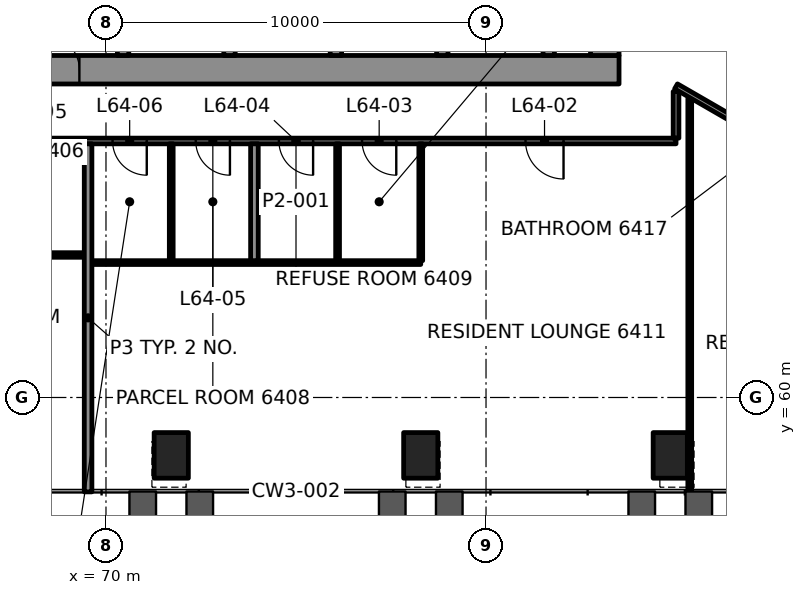
"""IFC4 building model, lengths in metres.
Left out: names, types, materials, properties, quantities, classifications, styles, units other than length and angle.
Written with IfcOpenShell. Run it as: python <this file> out.ifc"""

import sys

from ifc_helpers import new_model, si_unit, direction, frame, frame_2d, origin, origin_2d, place, context, subcontext, project, spatial, rectangle, hollow_rectangle, extrude, element, fill, save


model = new_model("IFC4")
c1 = context("Model", 3, precision=1e-05, world=origin(), true_north=direction((0.0, 1.0)))
c2 = subcontext(c1, "Body", "Model", "MODEL_VIEW")
j1 = project(units=[si_unit("LENGTHUNIT", "METRE"), si_unit("PLANEANGLEUNIT", "RADIAN")], contexts=[c1])
p1 = place(None, origin())
s1 = spatial("IfcSite", under=j1, at=p1, CompositionType="ELEMENT")
p2 = place(p1, origin())
s2 = spatial("IfcBuilding", under=s1, at=p2, CompositionType="ELEMENT")
p3 = place(p2, frame((0.0, 0.0, 270.6)))
s3 = spatial("IfcBuildingStorey", under=s2, at=p3, CompositionType="ELEMENT", Elevation=270.6)
for number, where, z_axis, x_axis in (
    (1, (71.717, 58.476, -0.0), (0.0, 0.0, 1.0), (1.0, 0.0, 0.0)),
    (2, (78.283, 58.476, -0.0), (0.0, 0.0, 1.0), (1.0, 0.0, 0.0)),
    (3, (84.848, 58.476, -0.0), (0.0, 0.0, 1.0), (1.0, 0.0, 0.0)),
):
    element("IfcColumn", number, at=place(p3, frame(where, z_axis=z_axis, x_axis=x_axis)), inside=s3, PredefinedType="COLUMN", context=c2, shape_type="SweptSolid", body=[
        extrude(hollow_rectangle(XDim=0.9, YDim=1.2, WallThickness=0.06, at=origin_2d()), origin(), (0.0, 0.0, 1.0), 3.5),
    ])
p4 = place(p3, frame((66.5, 68.625, 0.0), z_axis=(0.0, 0.0, 1.0), x_axis=(1.0, 0.0, 0.0)))
e4 = element("IfcWall", 4, at=p4, inside=s3, PredefinedType="SHEAR", context=c2, shape_type="SweptSolid", body=[
    extrude(rectangle(XDim=17.0, YDim=0.75, at=frame_2d((8.5, 0.0))), origin(), (0.0, 0.0, 1.0), 3.3),
])
p5 = place(p4, frame((1.9, 0.0, 0.0)))
e5 = element("IfcOpeningElement", 5, at=p5, cuts=e4, PredefinedType="OPENING", context=c2, shape_type="SweptSolid", body=[
    extrude(rectangle(XDim=0.9, YDim=2.1, at=frame_2d((0.45, 1.05))), frame((0.0, 0.385, 0.0), z_axis=(0.0, -1.0, 0.0), x_axis=(1.0, 0.0, 0.0)), (0.0, 0.0, 1.0), 0.77),
])
p6 = place(p3, frame((83.125, 69.0, 0.0), z_axis=(0.0, 0.0, 1.0), x_axis=(0.0, 1.0, 0.0)))
e6 = element("IfcWall", 6, at=p6, inside=s3, PredefinedType="SHEAR", context=c2, shape_type="SweptSolid", body=[
    extrude(rectangle(XDim=12.0, YDim=0.75, at=frame_2d((6.0, 0.0))), origin(), (0.0, 0.0, 1.0), 3.3),
])
p7 = place(p6, frame((3.4, 0.0, 0.0)))
e7 = element("IfcOpeningElement", 7, at=p7, cuts=e6, PredefinedType="OPENING", context=c2, shape_type="SweptSolid", body=[
    extrude(rectangle(XDim=1.8, YDim=2.1, at=frame_2d((0.9, 1.05))), frame((0.0, 0.385, 0.0), z_axis=(0.0, -1.0, 0.0), x_axis=(1.0, 0.0, 0.0)), (0.0, 0.0, 1.0), 0.77),
])
for number, where, z_axis, x_axis in (
    (8, (70.45, 69.0, 0.0), (0.0, 0.0, 1.0), (0.0, 1.0, 0.0)),
    (9, (73.25, 69.0, 0.0), (0.0, 0.0, 1.0), (0.0, 1.0, 0.0)),
    (10, (76.05, 69.0, 0.0), (0.0, 0.0, 1.0), (0.0, 1.0, 0.0)),
    (11, (78.85, 69.0, 0.0), (0.0, 0.0, 1.0), (0.0, 1.0, 0.0)),
    (12, (81.65, 69.0, 0.0), (0.0, 0.0, 1.0), (0.0, 1.0, 0.0)),
):
    element("IfcWall", number, at=place(p3, frame(where, z_axis=z_axis, x_axis=x_axis)), inside=s3, PredefinedType="SHEAR", context=c2, shape_type="SweptSolid", body=[
        extrude(rectangle(XDim=2.6, YDim=0.3, at=frame_2d((1.3, 0.0))), origin(), (0.0, 0.0, 1.0), 3.3),
    ])
p8 = place(p3, frame((69.629, 63.55, 0.0), z_axis=(0.0, 0.0, 1.0), x_axis=(1.0, 0.0, 0.0)))
e13 = element("IfcWall", 13, at=p8, inside=s3, PredefinedType="PARTITIONING", context=c2, shape_type="SweptSolid", body=[
    extrude(rectangle(XDim=8.653, YDim=0.1, at=frame_2d((4.326, 0.0))), origin(), (0.0, 0.0, 1.0), 2.7),
])
p9 = place(p3, frame((63.434, 63.75, 0.0), z_axis=(0.0, 0.0, 1.0), x_axis=(1.0, 0.0, 0.0)))
e14 = element("IfcWall", 14, at=p9, inside=s3, PredefinedType="PARTITIONING", context=c2, shape_type="SweptSolid", body=[
    extrude(rectangle(XDim=5.995, YDim=0.12, at=frame_2d((2.997, 0.0))), origin(), (0.0, 0.0, 1.0), 2.7),
])
p10 = place(p9, frame((3.199, 0.0, 0.0)))
e15 = element("IfcOpeningElement", 15, at=p10, cuts=e14, PredefinedType="OPENING", context=c2, shape_type="SweptSolid", body=[
    extrude(rectangle(XDim=0.9, YDim=2.1, at=frame_2d((0.45, 1.05))), frame((0.0, 0.07, 0.0), z_axis=(0.0, -1.0, 0.0), x_axis=(1.0, 0.0, 0.0)), (0.0, 0.0, 1.0), 0.14),
])
p11 = place(p3, frame((85.0, 66.75, 0.0), z_axis=(0.0, 0.0, 1.0), x_axis=(-1.0, 0.0, 0.0)))
e16 = element("IfcWall", 16, at=p11, inside=s3, PredefinedType="PARTITIONING", context=c2, shape_type="SweptSolid", body=[
    extrude(rectangle(XDim=19.999, YDim=0.15, at=frame_2d((10.0, 0.0))), origin(), (0.0, 0.0, 1.0), 2.7),
])
p12 = place(p11, frame((2.96, 0.0, 0.0)))
e17 = element("IfcOpeningElement", 17, at=p12, cuts=e16, PredefinedType="OPENING", context=c2, shape_type="SweptSolid", body=[
    extrude(rectangle(XDim=1.0, YDim=2.1, at=frame_2d((0.5, 1.05))), frame((0.0, 0.085, 0.0), z_axis=(0.0, -1.0, 0.0), x_axis=(1.0, 0.0, 0.0)), (0.0, 0.0, 1.0), 0.17),
])
p13 = place(p11, frame((7.361, 0.0, 0.0)))
e18 = element("IfcOpeningElement", 18, at=p13, cuts=e16, PredefinedType="OPENING", context=c2, shape_type="SweptSolid", body=[
    extrude(rectangle(XDim=0.9, YDim=2.1, at=frame_2d((0.45, 1.05))), frame((0.0, 0.085, 0.0), z_axis=(0.0, -1.0, 0.0), x_axis=(1.0, 0.0, 0.0)), (0.0, 0.0, 1.0), 0.17),
])
p14 = place(p11, frame((9.55, 0.0, 0.0)))
e19 = element("IfcOpeningElement", 19, at=p14, cuts=e16, PredefinedType="OPENING", context=c2, shape_type="SweptSolid", body=[
    extrude(rectangle(XDim=0.9, YDim=2.1, at=frame_2d((0.45, 1.05))), frame((0.0, 0.085, 0.0), z_axis=(0.0, -1.0, 0.0), x_axis=(1.0, 0.0, 0.0)), (0.0, 0.0, 1.0), 0.17),
])
p15 = place(p11, frame((11.738, 0.0, 0.0)))
e20 = element("IfcOpeningElement", 20, at=p15, cuts=e16, PredefinedType="OPENING", context=c2, shape_type="SweptSolid", body=[
    extrude(rectangle(XDim=0.9, YDim=2.1, at=frame_2d((0.45, 1.05))), frame((0.0, 0.085, 0.0), z_axis=(0.0, -1.0, 0.0), x_axis=(1.0, 0.0, 0.0)), (0.0, 0.0, 1.0), 0.17),
])
p16 = place(p11, frame((13.926, 0.0, 0.0)))
e21 = element("IfcOpeningElement", 21, at=p16, cuts=e16, PredefinedType="OPENING", context=c2, shape_type="SweptSolid", body=[
    extrude(rectangle(XDim=0.9, YDim=2.1, at=frame_2d((0.45, 1.05))), frame((0.0, 0.085, 0.0), z_axis=(0.0, -1.0, 0.0), x_axis=(1.0, 0.0, 0.0)), (0.0, 0.0, 1.0), 0.17),
])
p17 = place(p3, frame((85.361, 57.516, 0.0), z_axis=(0.0, 0.0, 1.0), x_axis=(0.0, 1.0, 0.0)))
e22 = element("IfcWall", 22, at=p17, inside=s3, PredefinedType="PARTITIONING", context=c2, shape_type="SweptSolid", body=[
    extrude(rectangle(XDim=10.346, YDim=0.1, at=frame_2d((5.173, 0.0))), origin(), (0.0, 0.0, 1.0), 2.547),
])
p18 = place(p3, frame((85.0, 66.825, 0.0), z_axis=(0.0, 0.0, 1.0), x_axis=(0.0, 1.0, 0.0)))
e23 = element("IfcWall", 23, at=p18, inside=s3, PredefinedType="PARTITIONING", context=c2, shape_type="SweptSolid", body=[
    extrude(rectangle(XDim=1.225, YDim=0.15, at=frame_2d((0.613, 0.0))), origin(), (0.0, 0.0, 1.0), 2.547),
])
p19 = place(p3, frame((78.283, 63.601, 0.0), z_axis=(0.0, 0.0, 1.0), x_axis=(0.0, 1.0, 0.0)))
e24 = element("IfcWall", 24, at=p19, inside=s3, PredefinedType="PARTITIONING", context=c2, shape_type="SweptSolid", body=[
    extrude(rectangle(XDim=3.074, YDim=0.1, at=frame_2d((1.537, 0.0))), origin(), (0.0, 0.0, 1.0), 2.7),
])
p20 = place(p3, frame((76.094, 63.6, 0.0), z_axis=(0.0, 0.0, 1.0), x_axis=(0.0, 1.0, 0.0)))
e25 = element("IfcWall", 25, at=p20, inside=s3, PredefinedType="PARTITIONING", context=c2, shape_type="SweptSolid", body=[
    extrude(rectangle(XDim=3.075, YDim=0.1, at=frame_2d((1.538, 0.0))), origin(), (0.0, 0.0, 1.0), 2.7),
])
p21 = place(p3, frame((73.906, 63.6, 0.0), z_axis=(0.0, 0.0, 1.0), x_axis=(0.0, 1.0, 0.0)))
e26 = element("IfcWall", 26, at=p21, inside=s3, PredefinedType="PARTITIONING", context=c2, shape_type="SweptSolid", body=[
    extrude(rectangle(XDim=3.075, YDim=0.2, at=frame_2d((1.538, 0.0))), origin(), (0.0, 0.0, 1.0), 2.7),
])
p22 = place(p3, frame((71.717, 63.6, 0.0), z_axis=(0.0, 0.0, 1.0), x_axis=(0.0, 1.0, 0.0)))
e27 = element("IfcWall", 27, at=p22, inside=s3, PredefinedType="PARTITIONING", context=c2, shape_type="SweptSolid", body=[
    extrude(rectangle(XDim=3.075, YDim=0.1, at=frame_2d((1.538, 0.0))), origin(), (0.0, 0.0, 1.0), 2.7),
])
p23 = place(p3, frame((69.529, 57.516, 0.0), z_axis=(0.0, 0.0, 1.0), x_axis=(0.0, 1.0, 0.0)))
e28 = element("IfcWall", 28, at=p23, inside=s3, PredefinedType="PARTITIONING", context=c2, shape_type="SweptSolid", body=[
    extrude(rectangle(XDim=9.159, YDim=0.2, at=frame_2d((4.579, 0.0))), origin(), (0.0, 0.0, 1.0), 2.688),
])
p24 = place(p3, frame((85.0, 70.266, 0.0), z_axis=(0.0, 0.0, 1.0), x_axis=(0.866026970734, -0.499997285954, 0.0)))
e29 = element("IfcWall", 29, at=p24, inside=s3, PredefinedType="PARTITIONING", context=c2, shape_type="SweptSolid", body=[
    extrude(rectangle(XDim=14.584, YDim=0.15, at=frame_2d((7.292, 0.0))), origin(), (0.0, 0.0, 1.0), 2.7),
])
p25 = place(p24, frame((10.094, 0.0, 0.0)))
e30 = element("IfcOpeningElement", 30, at=p25, cuts=e29, PredefinedType="OPENING", context=c2, shape_type="SweptSolid", body=[
    extrude(rectangle(XDim=1.0, YDim=2.1, at=frame_2d((0.5, 1.05))), frame((0.0, 0.085, 0.0), z_axis=(0.0, -1.0, 0.0), x_axis=(1.0, 0.0, 0.0)), (0.0, 0.0, 1.0), 0.17),
])
p26 = place(p3, frame((96.73, 61.415, 0.0), z_axis=(0.0, 0.0, 1.0), x_axis=(-0.866032805753, 0.499987179195, 0.0)))
e31 = element("IfcWall", 31, at=p26, inside=s3, PredefinedType="PARTITIONING", context=c2, shape_type="SweptSolid", body=[
    extrude(rectangle(XDim=13.545, YDim=0.15, at=frame_2d((6.772, 0.0))), origin(), (0.0, 0.0, 1.0), 2.547),
])
p27 = place(p26, frame((2.078, 0.0, 0.0)))
e32 = element("IfcOpeningElement", 32, at=p27, cuts=e31, PredefinedType="OPENING", context=c2, shape_type="SweptSolid", body=[
    extrude(rectangle(XDim=1.0, YDim=2.1, at=frame_2d((0.5, 1.05))), frame((0.0, 0.085, 0.0), z_axis=(0.0, -1.0, 0.0), x_axis=(1.0, 0.0, 0.0)), (0.0, 0.0, 1.0), 0.17),
])
p28 = place(p26, frame((8.54, 0.0, 0.0)))
e33 = element("IfcOpeningElement", 33, at=p28, cuts=e31, PredefinedType="OPENING", context=c2, shape_type="SweptSolid", body=[
    extrude(rectangle(XDim=1.0, YDim=2.1, at=frame_2d((0.5, 1.05))), frame((0.0, 0.085, 0.0), z_axis=(0.0, -1.0, 0.0), x_axis=(1.0, 0.0, 0.0)), (0.0, 0.0, 1.0), 0.17),
])
p29 = place(p12, origin())
e34 = element("IfcDoor", 34, at=p29, inside=s3, OperationType="SINGLE_SWING_LEFT", PredefinedType="DOOR", context=c2, shape_type="SweptSolid", body=[
    extrude(rectangle(XDim=1.0, YDim=2.1, at=frame_2d((0.5, 1.05))), frame((0.0, 0.025, 0.0), z_axis=(0.0, -1.0, 0.0), x_axis=(1.0, 0.0, 0.0)), (0.0, 0.0, 1.0), 0.05),
])
fill(e17, e34)
p30 = place(p13, origin())
e35 = element("IfcDoor", 35, at=p30, inside=s3, OperationType="SINGLE_SWING_RIGHT", PredefinedType="DOOR", context=c2, shape_type="SweptSolid", body=[
    extrude(rectangle(XDim=0.9, YDim=2.1, at=frame_2d((0.45, 1.05))), frame((0.0, 0.025, 0.0), z_axis=(0.0, -1.0, 0.0), x_axis=(1.0, 0.0, 0.0)), (0.0, 0.0, 1.0), 0.05),
])
fill(e18, e35)
p31 = place(p14, origin())
e36 = element("IfcDoor", 36, at=p31, inside=s3, OperationType="SINGLE_SWING_LEFT", PredefinedType="DOOR", context=c2, shape_type="SweptSolid", body=[
    extrude(rectangle(XDim=0.9, YDim=2.1, at=frame_2d((0.45, 1.05))), frame((0.0, 0.025, 0.0), z_axis=(0.0, -1.0, 0.0), x_axis=(1.0, 0.0, 0.0)), (0.0, 0.0, 1.0), 0.05),
])
fill(e19, e36)
p32 = place(p15, origin())
e37 = element("IfcDoor", 37, at=p32, inside=s3, OperationType="SINGLE_SWING_RIGHT", PredefinedType="DOOR", context=c2, shape_type="SweptSolid", body=[
    extrude(rectangle(XDim=0.9, YDim=2.1, at=frame_2d((0.45, 1.05))), frame((0.0, 0.025, 0.0), z_axis=(0.0, -1.0, 0.0), x_axis=(1.0, 0.0, 0.0)), (0.0, 0.0, 1.0), 0.05),
])
fill(e20, e37)
p33 = place(p16, origin())
e38 = element("IfcDoor", 38, at=p33, inside=s3, OperationType="SINGLE_SWING_LEFT", PredefinedType="DOOR", context=c2, shape_type="SweptSolid", body=[
    extrude(rectangle(XDim=0.9, YDim=2.1, at=frame_2d((0.45, 1.05))), frame((0.0, 0.025, 0.0), z_axis=(0.0, -1.0, 0.0), x_axis=(1.0, 0.0, 0.0)), (0.0, 0.0, 1.0), 0.05),
])
fill(e21, e38)
p34 = place(p5, origin())
e39 = element("IfcDoor", 39, at=p34, inside=s3, OperationType="SINGLE_SWING_RIGHT", PredefinedType="DOOR", context=c2, shape_type="SweptSolid", body=[
    extrude(rectangle(XDim=0.9, YDim=2.1, at=frame_2d((0.45, 1.05))), frame((0.0, 0.095, 0.0), z_axis=(0.0, -1.0, 0.0), x_axis=(1.0, 0.0, 0.0)), (0.0, 0.0, 1.0), 0.19),
])
fill(e5, e39)
save(model, sys.argv[1])
